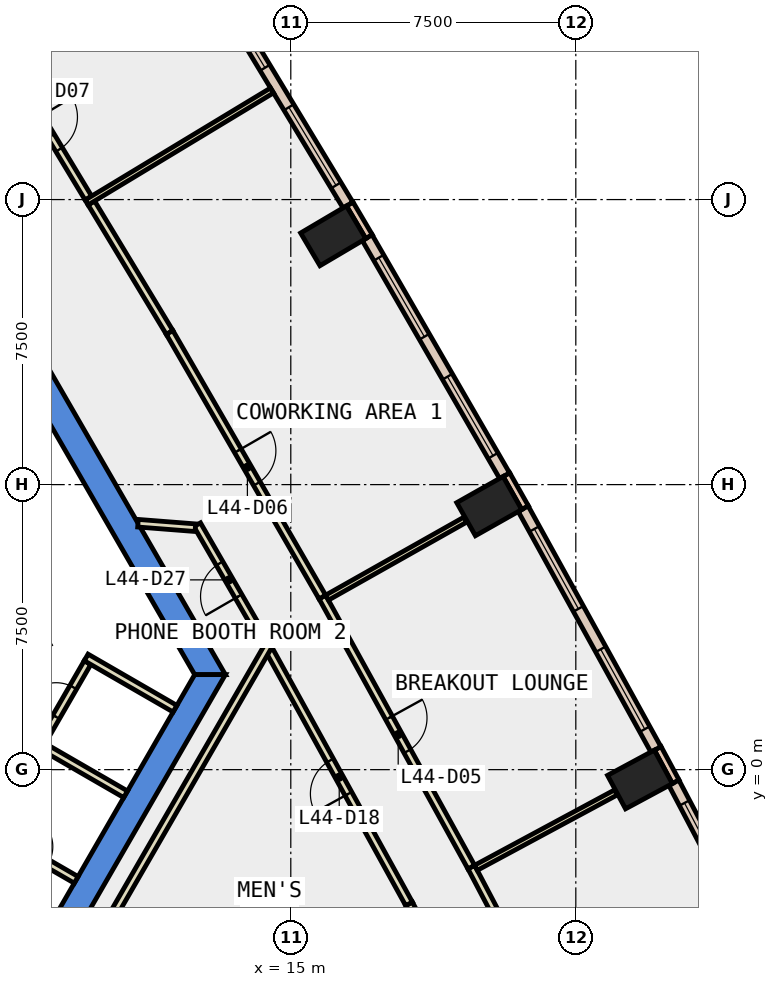
"""IFC4 building model, lengths in metres.
Left out: names, types, materials, properties, quantities, classifications, styles, units other than length and angle.
Written with IfcOpenShell. Run it as: python <this file> out.ifc"""

import sys

from ifc_helpers import new_model, si_unit, direction, frame, frame_2d, origin, origin_2d, place, context, subcontext, project, spatial, polyline, rectangle, outline, extrude, element, fill, save


model = new_model("IFC4")
c1 = context("Model", 3, precision=1e-05, world=origin(), true_north=direction((0.0, 1.0)))
c2 = subcontext(c1, "Body", "Model", "MODEL_VIEW")
j1 = project(units=[si_unit("LENGTHUNIT", "METRE"), si_unit("PLANEANGLEUNIT", "RADIAN")], contexts=[c1])
p1 = place(None, origin())
s1 = spatial("IfcSite", under=j1, at=p1, CompositionType="ELEMENT")
p2 = place(p1, origin())
s2 = spatial("IfcBuilding", under=s1, at=p2, CompositionType="ELEMENT")
p3 = place(p2, frame((0.0, 0.0, 198.2)))
s3 = spatial("IfcBuildingStorey", under=s2, at=p3, CompositionType="ELEMENT", Elevation=198.2)
for number, where, z_axis, x_axis in (
    (1, (24.188, -0.259, -0.4), (0.0, 0.0, 1.0), (-0.474, 0.88, 0.0)),
    (2, (20.222, 6.934, -0.4), (0.0, 0.0, 1.0), (-0.491, 0.871, 0.0)),
    (3, (16.116, 14.046, -0.4), (0.0, 0.0, 1.0), (-0.509, 0.861, 0.0)),
):
    element("IfcColumn", number, at=place(p3, frame(where, z_axis=z_axis, x_axis=x_axis)), inside=s3, PredefinedType="COLUMN", context=c2, shape_type="SweptSolid", body=[
        extrude(rectangle(XDim=1.0, YDim=1.4, at=origin_2d()), origin(), (0.0, 0.0, 1.0), 4.2),
    ])
p4 = place(p3, frame((0.0, 0.0, -0.4)))
e4 = element("IfcWall", 4, at=p4, inside=s3, PredefinedType="SHEAR", context=c2, shape_type="SweptSolid", body=[
    extrude(outline(polyline([(8.084, 11.498), (7.478, 11.148), (12.471, 2.5), (13.279, 2.5), (8.084, 11.498)])), origin(), (0.0, 0.0, 1.0), 4.2),
])
p5 = place(p3, frame((0.0, 0.0, -0.4)))
e5 = element("IfcWall", 5, at=p5, inside=s3, PredefinedType="SHEAR", context=c2, shape_type="SweptSolid", body=[
    extrude(outline(polyline([(6.64, -9.0), (13.279, 2.5), (12.471, 2.5), (6.235, -8.3), (6.64, -9.0)])), origin(), (0.0, 0.0, 1.0), 4.2),
])
p6 = place(p3, frame((25.129, -0.32, 0.0), z_axis=(0.0, 0.0, 1.0), x_axis=(-0.473663196434, 0.88070606694, 0.0)))
e6 = element("IfcWall", 6, at=p6, inside=s3, PredefinedType="STANDARD", context=c2, shape_type="SweptSolid", body=[
    extrude(rectangle(XDim=1.0, YDim=0.2, at=frame_2d((0.5, 0.0))), origin(), (0.0, 0.0, 1.0), 3.8),
])
p7 = place(p3, frame((21.165, 6.891, 0.0), z_axis=(0.0, 0.0, 1.0), x_axis=(-0.491848119507, 0.870681013539, 0.0)))
e7 = element("IfcWall", 7, at=p7, inside=s3, PredefinedType="STANDARD", context=c2, shape_type="SweptSolid", body=[
    extrude(rectangle(XDim=1.0, YDim=0.2, at=frame_2d((0.5, 0.0))), origin(), (0.0, 0.0, 1.0), 3.8),
])
p8 = place(p3, frame((17.059, 14.023, 0.0), z_axis=(0.0, 0.0, 1.0), x_axis=(-0.508161541526, 0.861261776531, 0.0)))
e8 = element("IfcWall", 8, at=p8, inside=s3, PredefinedType="STANDARD", context=c2, shape_type="SweptSolid", body=[
    extrude(rectangle(XDim=1.0, YDim=0.2, at=frame_2d((0.5, 0.0))), origin(), (0.0, 0.0, 1.0), 3.8),
])
p9 = place(p3, frame((28.435, -6.724, 0.0), z_axis=(0.0, 0.0, 1.0), x_axis=(-0.465478369088, 0.885059256723, 0.0)))
e9 = element("IfcWall", 9, at=p9, inside=s3, PredefinedType="STANDARD", context=c2, shape_type="SweptSolid", body=[
    extrude(rectangle(XDim=7.208, YDim=0.3, at=frame_2d((3.604, 0.0))), origin(), (0.0, 0.0, 1.0), 3.8),
])
p10 = place(p9, frame((0.602, 0.0, 0.9)))
e10 = element("IfcOpeningElement", 10, at=p10, cuts=e9, PredefinedType="OPENING", context=c2, shape_type="SweptSolid", body=[
    extrude(rectangle(XDim=2.4, YDim=2.6, at=frame_2d((1.2, 1.3))), frame((0.0, 0.16, 0.0), z_axis=(0.0, -1.0, 0.0), x_axis=(1.0, 0.0, 0.0)), (0.0, 0.0, 1.0), 0.32),
])
p11 = place(p9, frame((4.206, 0.0, 0.9)))
e11 = element("IfcOpeningElement", 11, at=p11, cuts=e9, PredefinedType="OPENING", context=c2, shape_type="SweptSolid", body=[
    extrude(rectangle(XDim=2.4, YDim=2.6, at=frame_2d((1.2, 1.3))), frame((0.0, 0.16, 0.0), z_axis=(0.0, -1.0, 0.0), x_axis=(1.0, 0.0, 0.0)), (0.0, 0.0, 1.0), 0.32),
])
p12 = place(p3, frame((24.607, 0.534, 0.0), z_axis=(0.0, 0.0, 1.0), x_axis=(-0.482862185961, 0.875696356832, 0.0)))
e12 = element("IfcWall", 12, at=p12, inside=s3, PredefinedType="STANDARD", context=c2, shape_type="SweptSolid", body=[
    extrude(rectangle(XDim=7.23, YDim=0.3, at=frame_2d((3.615, 0.0))), origin(), (0.0, 0.0, 1.0), 3.8),
])
p13 = place(p12, frame((0.607, 0.0, 0.9)))
e13 = element("IfcOpeningElement", 13, at=p13, cuts=e12, PredefinedType="OPENING", context=c2, shape_type="SweptSolid", body=[
    extrude(rectangle(XDim=2.4, YDim=2.6, at=frame_2d((1.2, 1.3))), frame((0.0, 0.16, 0.0), z_axis=(0.0, -1.0, 0.0), x_axis=(1.0, 0.0, 0.0)), (0.0, 0.0, 1.0), 0.32),
])
p14 = place(p12, frame((4.222, 0.0, 0.9)))
e14 = element("IfcOpeningElement", 14, at=p14, cuts=e12, PredefinedType="OPENING", context=c2, shape_type="SweptSolid", body=[
    extrude(rectangle(XDim=2.4, YDim=2.6, at=frame_2d((1.2, 1.3))), frame((0.0, 0.16, 0.0), z_axis=(0.0, -1.0, 0.0), x_axis=(1.0, 0.0, 0.0)), (0.0, 0.0, 1.0), 0.32),
])
p15 = place(p3, frame((20.626, 7.734, 0.0), z_axis=(0.0, 0.0, 1.0), x_axis=(-0.499948481376, 0.866055146033, 0.0)))
e15 = element("IfcWall", 15, at=p15, inside=s3, PredefinedType="STANDARD", context=c2, shape_type="SweptSolid", body=[
    extrude(rectangle(XDim=7.231, YDim=0.3, at=frame_2d((3.615, 0.0))), origin(), (0.0, 0.0, 1.0), 3.8),
])
p16 = place(p15, frame((0.608, 0.0, 0.9)))
e16 = element("IfcOpeningElement", 16, at=p16, cuts=e15, PredefinedType="OPENING", context=c2, shape_type="SweptSolid", body=[
    extrude(rectangle(XDim=2.4, YDim=2.6, at=frame_2d((1.2, 1.3))), frame((0.0, 0.16, 0.0), z_axis=(0.0, -1.0, 0.0), x_axis=(1.0, 0.0, 0.0)), (0.0, 0.0, 1.0), 0.32),
])
p17 = place(p15, frame((4.223, 0.0, 0.9)))
e17 = element("IfcOpeningElement", 17, at=p17, cuts=e15, PredefinedType="OPENING", context=c2, shape_type="SweptSolid", body=[
    extrude(rectangle(XDim=2.4, YDim=2.6, at=frame_2d((1.2, 1.3))), frame((0.0, 0.16, 0.0), z_axis=(0.0, -1.0, 0.0), x_axis=(1.0, 0.0, 0.0)), (0.0, 0.0, 1.0), 0.32),
])
p18 = place(p3, frame((16.504, 14.855, 0.0), z_axis=(0.0, 0.0, 1.0), x_axis=(-0.517159962006, 0.855888762456, 0.0)))
e18 = element("IfcWall", 18, at=p18, inside=s3, PredefinedType="STANDARD", context=c2, shape_type="SweptSolid", body=[
    extrude(rectangle(XDim=7.23, YDim=0.3, at=frame_2d((3.615, 0.0))), origin(), (0.0, 0.0, 1.0), 3.8),
])
p19 = place(p18, frame((0.607, 0.0, 0.9)))
e19 = element("IfcOpeningElement", 19, at=p19, cuts=e18, PredefinedType="OPENING", context=c2, shape_type="SweptSolid", body=[
    extrude(rectangle(XDim=2.4, YDim=2.6, at=frame_2d((1.2, 1.3))), frame((0.0, 0.16, 0.0), z_axis=(0.0, -1.0, 0.0), x_axis=(1.0, 0.0, 0.0)), (0.0, 0.0, 1.0), 0.32),
])
p20 = place(p18, frame((4.222, 0.0, 0.9)))
e20 = element("IfcOpeningElement", 20, at=p20, cuts=e18, PredefinedType="OPENING", context=c2, shape_type="SweptSolid", body=[
    extrude(rectangle(XDim=2.4, YDim=2.6, at=frame_2d((1.2, 1.3))), frame((0.0, 0.16, 0.0), z_axis=(0.0, -1.0, 0.0), x_axis=(1.0, 0.0, 0.0)), (0.0, 0.0, 1.0), 0.32),
])
p21 = place(p3, frame((14.213, 3.543, 0.0), z_axis=(0.0, 0.0, 1.0), x_axis=(-0.500182898346, 0.865919781621, 0.0)))
e21 = element("IfcWall", 21, at=p21, inside=s3, PredefinedType="PARTITIONING", context=c2, shape_type="SweptSolid", body=[
    extrude(rectangle(XDim=3.35, YDim=0.2, at=frame_2d((1.675, 0.0))), origin(), (0.0, 0.0, 1.0), 3.8),
])
p22 = place(p21, frame((1.175, 0.0, 0.0)))
e22 = element("IfcOpeningElement", 22, at=p22, cuts=e21, PredefinedType="OPENING", context=c2, shape_type="SweptSolid", body=[
    extrude(rectangle(XDim=1.0, YDim=2.1, at=frame_2d((0.5, 1.05))), frame((0.0, 0.11, 0.0), z_axis=(0.0, -1.0, 0.0), x_axis=(1.0, 0.0, 0.0)), (0.0, 0.0, 1.0), 0.22),
])
p23 = place(p3, frame((12.488, 6.366, 0.0), z_axis=(0.0, 0.0, 1.0), x_axis=(-0.996960771308, 0.077905201835, 0.0)))
e23 = element("IfcWall", 23, at=p23, inside=s3, PredefinedType="PARTITIONING", context=c2, shape_type="SweptSolid", body=[
    extrude(rectangle(XDim=1.514, YDim=0.2, at=frame_2d((0.757, 0.0))), origin(), (0.0, 0.0, 1.0), 3.8),
])
p24 = place(p3, frame((18.836, -4.906, 0.0), z_axis=(0.0, 0.0, 1.0), x_axis=(-0.465843561357, 0.884867095299, 0.0)))
e24 = element("IfcWall", 24, at=p24, inside=s3, PredefinedType="PARTITIONING", context=c2, shape_type="SweptSolid", body=[
    extrude(rectangle(XDim=1.554, YDim=0.2, at=frame_2d((0.777, 0.0))), origin(), (0.0, 0.0, 1.0), 3.8),
])
p25 = place(p3, frame((18.112, -3.531, 0.0), z_axis=(0.0, 0.0, 1.0), x_axis=(-0.482800061144, 0.875730609811, 0.0)))
e25 = element("IfcWall", 25, at=p25, inside=s3, PredefinedType="PARTITIONING", context=c2, shape_type="SweptSolid", body=[
    extrude(rectangle(XDim=7.612, YDim=0.2, at=frame_2d((3.806, 0.0))), origin(), (0.0, 0.0, 1.0), 3.8),
])
p26 = place(p25, frame((3.306, 0.0, 0.0)))
e26 = element("IfcOpeningElement", 26, at=p26, cuts=e25, PredefinedType="OPENING", context=c2, shape_type="SweptSolid", body=[
    extrude(rectangle(XDim=1.0, YDim=2.1, at=frame_2d((0.5, 1.05))), frame((0.0, 0.11, 0.0), z_axis=(0.0, -1.0, 0.0), x_axis=(1.0, 0.0, 0.0)), (0.0, 0.0, 1.0), 0.22),
])
p27 = place(p3, frame((19.75, -2.563, 0.0), z_axis=(0.0, 0.0, 1.0), x_axis=(0.465444987791, -0.885076812113, 0.0)))
e27 = element("IfcWall", 27, at=p27, inside=s3, PredefinedType="PARTITIONING", context=c2, shape_type="SweptSolid", body=[
    extrude(rectangle(XDim=7.578, YDim=0.2, at=frame_2d((3.789, 0.0))), origin(), (0.0, 0.0, 1.0), 3.8),
])
p28 = place(p27, frame((3.289, 0.0, 0.0)))
e28 = element("IfcOpeningElement", 28, at=p28, cuts=e27, PredefinedType="OPENING", context=c2, shape_type="SweptSolid", body=[
    extrude(rectangle(XDim=1.0, YDim=2.1, at=frame_2d((0.5, 1.05))), frame((0.0, 0.11, 0.0), z_axis=(0.0, -1.0, 0.0), x_axis=(1.0, 0.0, 0.0)), (0.0, 0.0, 1.0), 0.22),
])
p29 = place(p3, frame((15.831, 4.542, 0.0), z_axis=(0.0, 0.0, 1.0), x_axis=(0.482835531749, -0.875711053533, 0.0)))
e29 = element("IfcWall", 29, at=p29, inside=s3, PredefinedType="PARTITIONING", context=c2, shape_type="SweptSolid", body=[
    extrude(rectangle(XDim=8.115, YDim=0.2, at=frame_2d((4.057, 0.0))), origin(), (0.0, 0.0, 1.0), 3.8),
])
p30 = place(p29, frame((3.632, 0.0, 0.0)))
e30 = element("IfcOpeningElement", 30, at=p30, cuts=e29, PredefinedType="OPENING", context=c2, shape_type="SweptSolid", body=[
    extrude(rectangle(XDim=1.0, YDim=2.1, at=frame_2d((0.5, 1.05))), frame((0.0, 0.11, 0.0), z_axis=(0.0, -1.0, 0.0), x_axis=(1.0, 0.0, 0.0)), (0.0, 0.0, 1.0), 0.22),
])
p31 = place(p3, frame((9.752, 14.911, 0.0), z_axis=(0.0, 0.0, 1.0), x_axis=(0.517135291957, -0.855903668535, 0.0)))
e31 = element("IfcWall", 31, at=p31, inside=s3, PredefinedType="PARTITIONING", context=c2, shape_type="SweptSolid", body=[
    extrude(rectangle(XDim=3.982, YDim=0.2, at=frame_2d((1.991, 0.0))), origin(), (0.0, 0.0, 1.0), 3.8),
])
p32 = place(p3, frame((11.811, 11.503, 0.0), z_axis=(0.0, 0.0, 1.0), x_axis=(0.500013420409, -0.866017655369, 0.0)))
e32 = element("IfcWall", 32, at=p32, inside=s3, PredefinedType="PARTITIONING", context=c2, shape_type="SweptSolid", body=[
    extrude(rectangle(XDim=8.038, YDim=0.2, at=frame_2d((4.019, 0.0))), origin(), (0.0, 0.0, 1.0), 3.8),
])
p33 = place(p32, frame((3.594, 0.0, 0.0)))
e33 = element("IfcOpeningElement", 33, at=p33, cuts=e32, PredefinedType="OPENING", context=c2, shape_type="SweptSolid", body=[
    extrude(rectangle(XDim=1.0, YDim=2.1, at=frame_2d((0.5, 1.05))), frame((0.0, 0.11, 0.0), z_axis=(0.0, -1.0, 0.0), x_axis=(1.0, 0.0, 0.0)), (0.0, 0.0, 1.0), 0.22),
])
p34 = place(p3, frame((7.615, 18.449, 0.0), z_axis=(0.0, 0.0, 1.0), x_axis=(0.516918251554, -0.856034766356, 0.0)))
e34 = element("IfcWall", 34, at=p34, inside=s3, PredefinedType="PARTITIONING", context=c2, shape_type="SweptSolid", body=[
    extrude(rectangle(XDim=3.983, YDim=0.2, at=frame_2d((1.992, 0.0))), origin(), (0.0, 0.0, 1.0), 3.8),
])
p35 = place(p34, frame((1.492, 0.0, 0.0)))
e35 = element("IfcOpeningElement", 35, at=p35, cuts=e34, PredefinedType="OPENING", context=c2, shape_type="SweptSolid", body=[
    extrude(rectangle(XDim=1.0, YDim=2.1, at=frame_2d((0.5, 1.05))), frame((0.0, 0.11, 0.0), z_axis=(0.0, -1.0, 0.0), x_axis=(1.0, 0.0, 0.0)), (0.0, 0.0, 1.0), 0.22),
])
p36 = place(p3, frame((7.188, -1.65, 0.0), z_axis=(0.0, 0.0, 1.0), x_axis=(0.866022959057, -0.500004234368, 0.0)))
e36 = element("IfcWall", 36, at=p36, inside=s3, PredefinedType="PARTITIONING", context=c2, shape_type="SweptSolid", body=[
    extrude(rectangle(XDim=2.5, YDim=0.2, at=frame_2d((1.25, 0.0))), origin(), (0.0, 0.0, 1.0), 3.8),
])
p37 = place(p36, frame((0.75, 0.0, 0.0)))
e37 = element("IfcOpeningElement", 37, at=p37, cuts=e36, PredefinedType="OPENING", context=c2, shape_type="SweptSolid", body=[
    extrude(rectangle(XDim=0.9, YDim=2.1, at=frame_2d((0.45, 1.05))), frame((0.0, 0.11, 0.0), z_axis=(0.0, -1.0, 0.0), x_axis=(1.0, 0.0, 0.0)), (0.0, 0.0, 1.0), 0.22),
])
p38 = place(p3, frame((10.653, -0.648, 0.0), z_axis=(0.0, 0.0, 1.0), x_axis=(-0.866036505625, 0.499980770555, 0.0)))
e38 = element("IfcWall", 38, at=p38, inside=s3, PredefinedType="PARTITIONING", context=c2, shape_type="SweptSolid", body=[
    extrude(rectangle(XDim=2.7, YDim=0.2, at=frame_2d((1.35, 0.0))), origin(), (0.0, 0.0, 1.0), 3.8),
])
p39 = place(p3, frame((8.451, 0.738, 0.0), z_axis=(0.0, 0.0, 1.0), x_axis=(0.499913221443, 0.866075499611, 0.0)))
e39 = element("IfcWall", 39, at=p39, inside=s3, PredefinedType="PARTITIONING", context=c2, shape_type="SweptSolid", body=[
    extrude(rectangle(XDim=2.4, YDim=0.2, at=frame_2d((1.2, 0.0))), origin(), (0.0, 0.0, 1.0), 3.8),
])
p40 = place(p39, frame((0.75, 0.0, 0.0)))
e40 = element("IfcOpeningElement", 40, at=p40, cuts=e39, PredefinedType="OPENING", context=c2, shape_type="SweptSolid", body=[
    extrude(rectangle(XDim=0.9, YDim=2.1, at=frame_2d((0.45, 1.05))), frame((0.0, 0.11, 0.0), z_axis=(0.0, -1.0, 0.0), x_axis=(1.0, 0.0, 0.0)), (0.0, 0.0, 1.0), 0.22),
])
p41 = place(p3, frame((9.615, 2.953, 0.0), z_axis=(0.0, 0.0, 1.0), x_axis=(0.866013897511, -0.50001992892, 0.0)))
e41 = element("IfcWall", 41, at=p41, inside=s3, PredefinedType="PARTITIONING", context=c2, shape_type="SweptSolid", body=[
    extrude(rectangle(XDim=2.7, YDim=0.2, at=frame_2d((1.35, 0.0))), origin(), (0.0, 0.0, 1.0), 3.8),
])
p42 = place(p3, frame((9.781, -4.758, 0.0), z_axis=(0.0, 0.0, 1.0), x_axis=(0.50003174578, 0.866007074574, 0.0)))
e42 = element("IfcWall", 42, at=p42, inside=s3, PredefinedType="PARTITIONING", context=c2, shape_type="SweptSolid", body=[
    extrude(rectangle(XDim=9.315, YDim=0.2, at=frame_2d((4.658, 0.0))), origin(), (0.0, 0.0, 1.0), 3.8),
])
p43 = place(p3, frame((19.873, -2.582, 0.0), z_axis=(0.0, 0.0, 1.0), x_axis=(0.880480475723, 0.474082410421, 0.0)))
e43 = element("IfcWall", 43, at=p43, inside=s3, PredefinedType="PARTITIONING", context=c2, shape_type="SweptSolid", body=[
    extrude(rectangle(XDim=4.181, YDim=0.15, at=frame_2d((2.09, 0.0))), origin(), (0.0, 0.0, 1.0), 3.8),
])
p44 = place(p3, frame((15.954, 4.526, 0.0), z_axis=(0.0, 0.0, 1.0), x_axis=(0.870940016277, 0.491389344663, 0.0)))
e44 = element("IfcWall", 44, at=p44, inside=s3, PredefinedType="PARTITIONING", context=c2, shape_type="SweptSolid", body=[
    extrude(rectangle(XDim=4.18, YDim=0.15, at=frame_2d((2.09, 0.0))), origin(), (0.0, 0.0, 1.0), 3.8),
])
p45 = place(p3, frame((9.628, 14.924, 0.0), z_axis=(0.0, 0.0, 1.0), x_axis=(0.855931736607, 0.517088834021, 0.0)))
e45 = element("IfcWall", 45, at=p45, inside=s3, PredefinedType="PARTITIONING", context=c2, shape_type="SweptSolid", body=[
    extrude(rectangle(XDim=5.699, YDim=0.15, at=frame_2d((2.85, 0.0))), origin(), (0.0, 0.0, 1.0), 3.8),
])
p46 = place(p11, origin())
e46 = element("IfcWindow", 46, at=p46, inside=s3, PartitioningType="SINGLE_PANEL", PredefinedType="WINDOW", context=c2, shape_type="SweptSolid", body=[
    extrude(rectangle(XDim=2.4, YDim=2.6, at=frame_2d((1.2, 1.3))), frame((0.0, 0.03, 0.0), z_axis=(0.0, -1.0, 0.0), x_axis=(1.0, 0.0, 0.0)), (0.0, 0.0, 1.0), 0.06),
])
fill(e11, e46)
p47 = place(p13, origin())
e47 = element("IfcWindow", 47, at=p47, inside=s3, PartitioningType="SINGLE_PANEL", PredefinedType="WINDOW", context=c2, shape_type="SweptSolid", body=[
    extrude(rectangle(XDim=2.4, YDim=2.6, at=frame_2d((1.2, 1.3))), frame((0.0, 0.03, 0.0), z_axis=(0.0, -1.0, 0.0), x_axis=(1.0, 0.0, 0.0)), (0.0, 0.0, 1.0), 0.06),
])
fill(e13, e47)
p48 = place(p14, origin())
e48 = element("IfcWindow", 48, at=p48, inside=s3, PartitioningType="SINGLE_PANEL", PredefinedType="WINDOW", context=c2, shape_type="SweptSolid", body=[
    extrude(rectangle(XDim=2.4, YDim=2.6, at=frame_2d((1.2, 1.3))), frame((0.0, 0.03, 0.0), z_axis=(0.0, -1.0, 0.0), x_axis=(1.0, 0.0, 0.0)), (0.0, 0.0, 1.0), 0.06),
])
fill(e14, e48)
p49 = place(p16, origin())
e49 = element("IfcWindow", 49, at=p49, inside=s3, PartitioningType="SINGLE_PANEL", PredefinedType="WINDOW", context=c2, shape_type="SweptSolid", body=[
    extrude(rectangle(XDim=2.4, YDim=2.6, at=frame_2d((1.2, 1.3))), frame((0.0, 0.03, 0.0), z_axis=(0.0, -1.0, 0.0), x_axis=(1.0, 0.0, 0.0)), (0.0, 0.0, 1.0), 0.06),
])
fill(e16, e49)
p50 = place(p17, origin())
e50 = element("IfcWindow", 50, at=p50, inside=s3, PartitioningType="SINGLE_PANEL", PredefinedType="WINDOW", context=c2, shape_type="SweptSolid", body=[
    extrude(rectangle(XDim=2.4, YDim=2.6, at=frame_2d((1.2, 1.3))), frame((0.0, 0.03, 0.0), z_axis=(0.0, -1.0, 0.0), x_axis=(1.0, 0.0, 0.0)), (0.0, 0.0, 1.0), 0.06),
])
fill(e17, e50)
p51 = place(p19, origin())
e51 = element("IfcWindow", 51, at=p51, inside=s3, PartitioningType="SINGLE_PANEL", PredefinedType="WINDOW", context=c2, shape_type="SweptSolid", body=[
    extrude(rectangle(XDim=2.4, YDim=2.6, at=frame_2d((1.2, 1.3))), frame((0.0, 0.03, 0.0), z_axis=(0.0, -1.0, 0.0), x_axis=(1.0, 0.0, 0.0)), (0.0, 0.0, 1.0), 0.06),
])
fill(e19, e51)
p52 = place(p20, origin())
e52 = element("IfcWindow", 52, at=p52, inside=s3, PartitioningType="SINGLE_PANEL", PredefinedType="WINDOW", context=c2, shape_type="SweptSolid", body=[
    extrude(rectangle(XDim=2.4, YDim=2.6, at=frame_2d((1.2, 1.3))), frame((0.0, 0.03, 0.0), z_axis=(0.0, -1.0, 0.0), x_axis=(1.0, 0.0, 0.0)), (0.0, 0.0, 1.0), 0.06),
])
fill(e20, e52)
p53 = place(p30, origin())
e53 = element("IfcDoor", 53, at=p53, inside=s3, OperationType="SINGLE_SWING_RIGHT", PredefinedType="DOOR", context=c2, shape_type="SweptSolid", body=[
    extrude(rectangle(XDim=1.0, YDim=2.1, at=frame_2d((0.5, 1.05))), frame((0.0, 0.025, 0.0), z_axis=(0.0, -1.0, 0.0), x_axis=(1.0, 0.0, 0.0)), (0.0, 0.0, 1.0), 0.05),
])
fill(e30, e53)
p54 = place(p33, origin())
e54 = element("IfcDoor", 54, at=p54, inside=s3, OperationType="SINGLE_SWING_LEFT", PredefinedType="DOOR", context=c2, shape_type="SweptSolid", body=[
    extrude(rectangle(XDim=1.0, YDim=2.1, at=frame_2d((0.5, 1.05))), frame((0.0, 0.025, 0.0), z_axis=(0.0, -1.0, 0.0), x_axis=(1.0, 0.0, 0.0)), (0.0, 0.0, 1.0), 0.05),
])
fill(e33, e54)
p55 = place(p35, origin())
e55 = element("IfcDoor", 55, at=p55, inside=s3, OperationType="SINGLE_SWING_LEFT", PredefinedType="DOOR", context=c2, shape_type="SweptSolid", body=[
    extrude(rectangle(XDim=1.0, YDim=2.1, at=frame_2d((0.5, 1.05))), frame((0.0, 0.025, 0.0), z_axis=(0.0, -1.0, 0.0), x_axis=(1.0, 0.0, 0.0)), (0.0, 0.0, 1.0), 0.05),
])
fill(e35, e55)
p56 = place(p26, origin())
e56 = element("IfcDoor", 56, at=p56, inside=s3, OperationType="SINGLE_SWING_LEFT", PredefinedType="DOOR", context=c2, shape_type="SweptSolid", body=[
    extrude(rectangle(XDim=1.0, YDim=2.1, at=frame_2d((0.5, 1.05))), frame((0.0, 0.025, 0.0), z_axis=(0.0, -1.0, 0.0), x_axis=(1.0, 0.0, 0.0)), (0.0, 0.0, 1.0), 0.05),
])
fill(e26, e56)
p57 = place(p22, origin())
e57 = element("IfcDoor", 57, at=p57, inside=s3, OperationType="SINGLE_SWING_LEFT", PredefinedType="DOOR", context=c2, shape_type="SweptSolid", body=[
    extrude(rectangle(XDim=1.0, YDim=2.1, at=frame_2d((0.5, 1.05))), frame((0.0, 0.025, 0.0), z_axis=(0.0, -1.0, 0.0), x_axis=(1.0, 0.0, 0.0)), (0.0, 0.0, 1.0), 0.05),
])
fill(e22, e57)
p58 = place(p40, origin())
e58 = element("IfcDoor", 58, at=p58, inside=s3, OperationType="SINGLE_SWING_LEFT", PredefinedType="DOOR", context=c2, shape_type="SweptSolid", body=[
    extrude(rectangle(XDim=0.9, YDim=2.1, at=frame_2d((0.45, 1.05))), frame((0.0, 0.025, 0.0), z_axis=(0.0, -1.0, 0.0), x_axis=(1.0, 0.0, 0.0)), (0.0, 0.0, 1.0), 0.05),
])
fill(e40, e58)
save(model, sys.argv[1])
